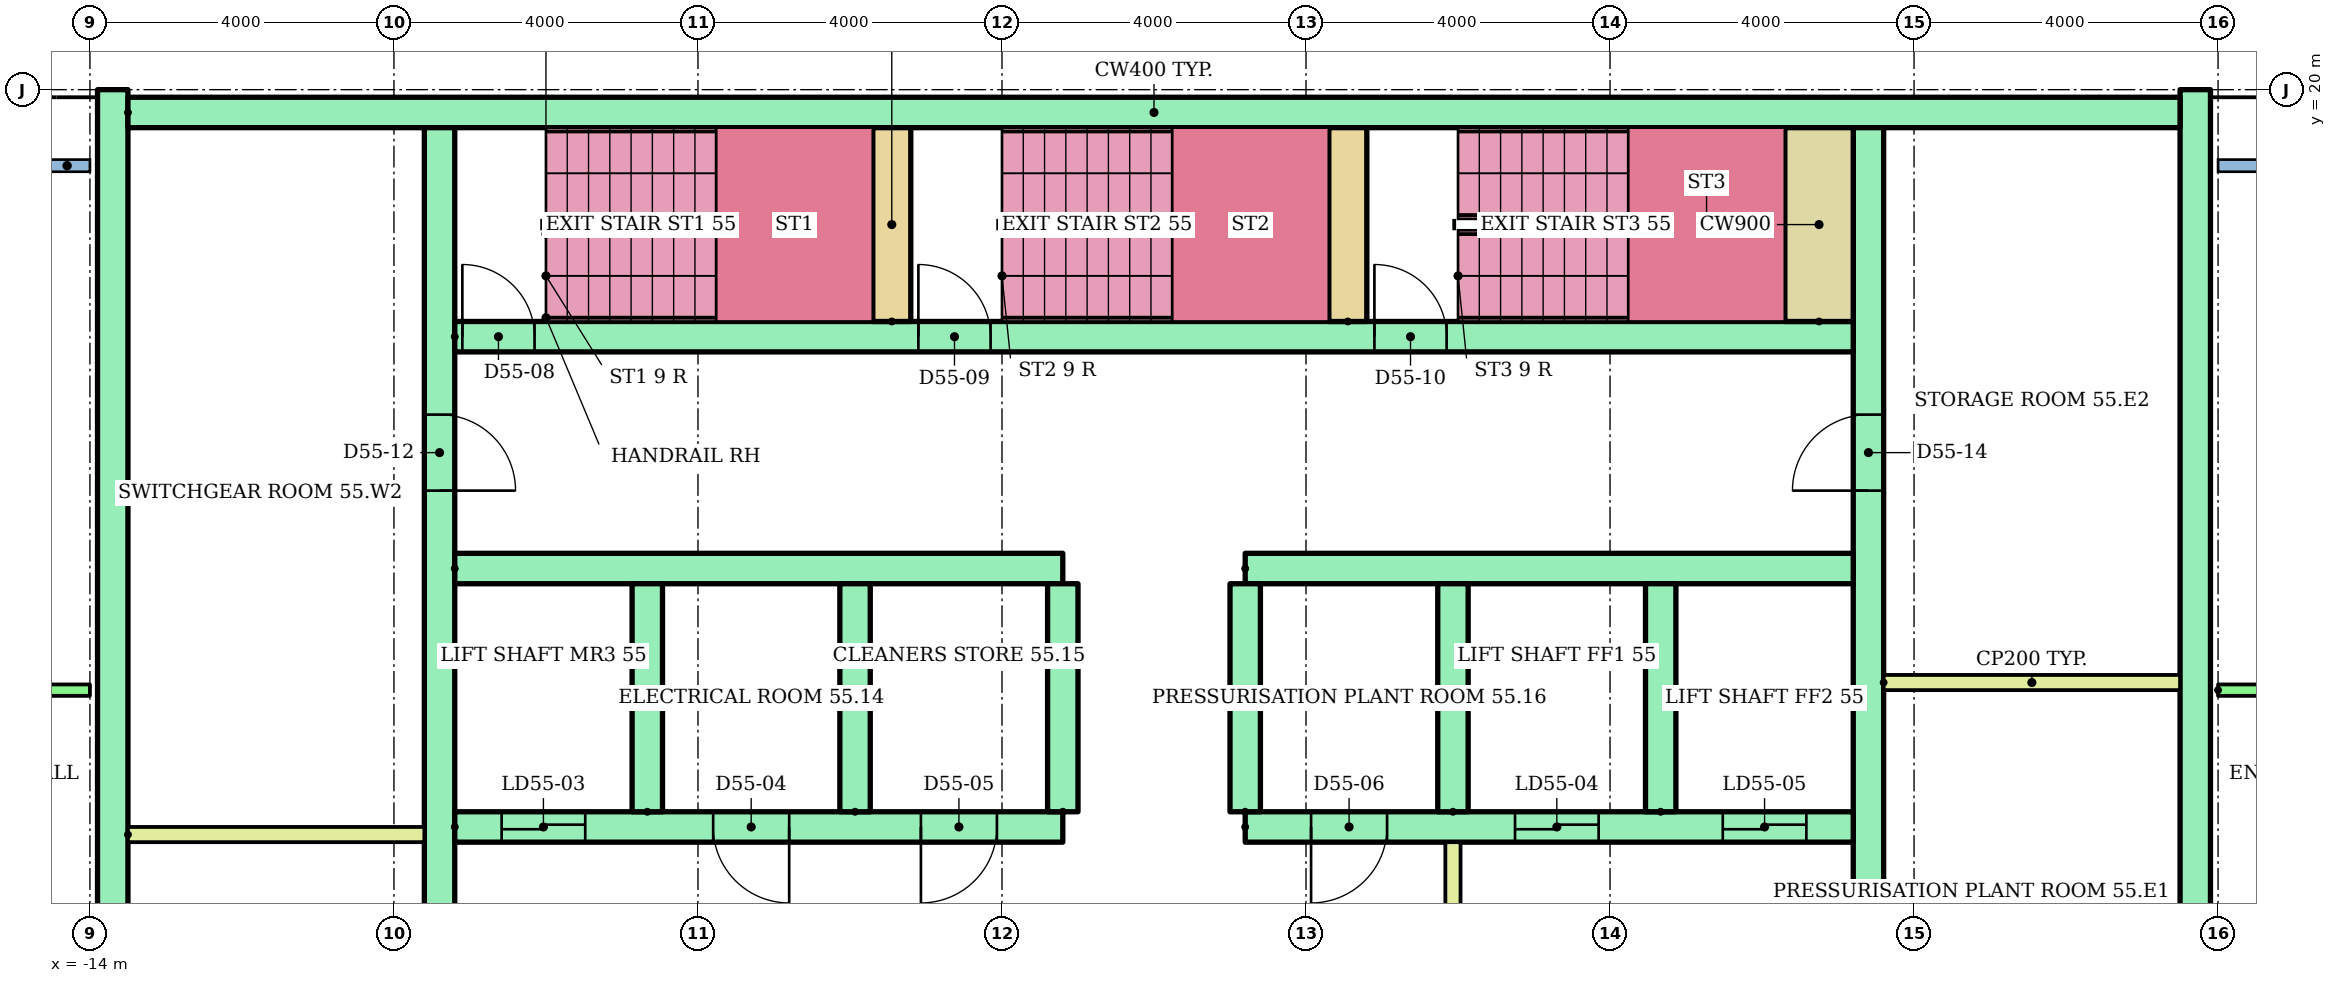
"""IFC4 building model, lengths in metres.
Left out: names, types, materials, properties, quantities, classifications, styles, units other than length and angle.
Written with IfcOpenShell. Run it as: python <this file> out.ifc"""

import sys

from ifc_helpers import new_model, si_unit, direction, frame, frame_2d, origin, place, context, subcontext, project, spatial, rectangle, extrude, element, fill, save


model = new_model("IFC4")
c1 = context("Model", 3, precision=1e-05, world=origin(), true_north=direction((0.0, 1.0)))
c2 = subcontext(c1, "Body", "Model", "MODEL_VIEW")
j1 = project(units=[si_unit("LENGTHUNIT", "METRE"), si_unit("PLANEANGLEUNIT", "RADIAN")], contexts=[c1])
p1 = place(None, origin())
s1 = spatial("IfcSite", under=j1, at=p1, CompositionType="ELEMENT")
p2 = place(p1, origin())
s2 = spatial("IfcBuilding", under=s1, at=p2, CompositionType="ELEMENT")
p3 = place(p2, frame((0.0, 0.0, 214.0)))
s3 = spatial("IfcBuildingStorey", under=s2, at=p3, CompositionType="ELEMENT", Elevation=214.0)
for number, where, z_axis, x_axis in (
    (1, (-13.7, 3.0, 0.0), (0.0, 0.0, 1.0), (0.0, 1.0, 0.0)),
    (2, (13.7, 3.0, 0.0), (0.0, 0.0, 1.0), (0.0, 1.0, 0.0)),
):
    element("IfcWall", number, at=place(p3, frame(where, z_axis=z_axis, x_axis=x_axis)), inside=s3, PredefinedType="SHEAR", context=c2, shape_type="SweptSolid", body=[
        extrude(rectangle(XDim=17.0, YDim=0.4, at=frame_2d((8.5, 0.0))), origin(), (0.0, 0.0, 1.0), 2.92),
    ])
p4 = place(p3, frame((-13.5, 19.7, 0.0)))
e3 = element("IfcWall", 3, at=p4, inside=s3, PredefinedType="SHEAR", context=c2, shape_type="SweptSolid", body=[
    extrude(rectangle(XDim=27.0, YDim=0.4, at=frame_2d((13.5, 0.0))), origin(), (0.0, 0.0, 1.0), 2.92),
])
p5 = place(p3, frame((-9.4, 6.8, 0.0), z_axis=(0.0, 0.0, 1.0), x_axis=(0.0, 1.0, 0.0)))
e4 = element("IfcWall", 4, at=p5, inside=s3, PredefinedType="SHEAR", context=c2, shape_type="SweptSolid", body=[
    extrude(rectangle(XDim=12.7, YDim=0.4, at=frame_2d((6.35, 0.0))), origin(), (0.0, 0.0, 1.0), 2.92),
])
p6 = place(p5, frame((1.15, 0.0, 0.0)))
e5 = element("IfcOpeningElement", 5, at=p6, cuts=e4, PredefinedType="OPENING", context=c2, shape_type="SweptSolid", body=[
    extrude(rectangle(XDim=1.0, YDim=2.1, at=frame_2d((0.5, 1.05))), frame((0.0, 0.21, 0.0), z_axis=(0.0, -1.0, 0.0), x_axis=(1.0, 0.0, 0.0)), (0.0, 0.0, 1.0), 0.42),
])
p7 = place(p5, frame((7.925, 0.0, 0.0)))
e6 = element("IfcOpeningElement", 6, at=p7, cuts=e4, PredefinedType="OPENING", context=c2, shape_type="SweptSolid", body=[
    extrude(rectangle(XDim=1.0, YDim=2.1, at=frame_2d((0.5, 1.05))), frame((0.0, 0.21, 0.0), z_axis=(0.0, -1.0, 0.0), x_axis=(1.0, 0.0, 0.0)), (0.0, 0.0, 1.0), 0.42),
])
p8 = place(p3, frame((9.4, 6.8, 0.0), z_axis=(0.0, 0.0, 1.0), x_axis=(0.0, 1.0, 0.0)))
e7 = element("IfcWall", 7, at=p8, inside=s3, PredefinedType="SHEAR", context=c2, shape_type="SweptSolid", body=[
    extrude(rectangle(XDim=12.7, YDim=0.4, at=frame_2d((6.35, 0.0))), origin(), (0.0, 0.0, 1.0), 2.92),
])
p9 = place(p8, frame((1.15, 0.0, 0.0)))
e8 = element("IfcOpeningElement", 8, at=p9, cuts=e7, PredefinedType="OPENING", context=c2, shape_type="SweptSolid", body=[
    extrude(rectangle(XDim=1.0, YDim=2.1, at=frame_2d((0.5, 1.05))), frame((0.0, 0.21, 0.0), z_axis=(0.0, -1.0, 0.0), x_axis=(1.0, 0.0, 0.0)), (0.0, 0.0, 1.0), 0.42),
])
p10 = place(p8, frame((7.925, 0.0, 0.0)))
e9 = element("IfcOpeningElement", 9, at=p10, cuts=e7, PredefinedType="OPENING", context=c2, shape_type="SweptSolid", body=[
    extrude(rectangle(XDim=1.0, YDim=2.1, at=frame_2d((0.5, 1.05))), frame((0.0, 0.21, 0.0), z_axis=(0.0, -1.0, 0.0), x_axis=(1.0, 0.0, 0.0)), (0.0, 0.0, 1.0), 0.42),
])
p11 = place(p3, frame((-9.2, 10.3, 0.0)))
e10 = element("IfcWall", 10, at=p11, inside=s3, PredefinedType="SHEAR", context=c2, shape_type="SweptSolid", body=[
    extrude(rectangle(XDim=8.0, YDim=0.4, at=frame_2d((4.0, 0.0))), origin(), (0.0, 0.0, 1.0), 2.92),
])
p12 = place(p11, frame((0.617, 0.0, 0.0)))
e11 = element("IfcOpeningElement", 11, at=p12, cuts=e10, PredefinedType="OPENING", context=c2, shape_type="SweptSolid", body=[
    extrude(rectangle(XDim=1.1, YDim=2.1, at=frame_2d((0.55, 1.05))), frame((0.0, 0.21, 0.0), z_axis=(0.0, -1.0, 0.0), x_axis=(1.0, 0.0, 0.0)), (0.0, 0.0, 1.0), 0.42),
])
p13 = place(p11, frame((3.4, 0.0, 0.0)))
e12 = element("IfcOpeningElement", 12, at=p13, cuts=e10, PredefinedType="OPENING", context=c2, shape_type="SweptSolid", body=[
    extrude(rectangle(XDim=1.0, YDim=2.1, at=frame_2d((0.5, 1.05))), frame((0.0, 0.21, 0.0), z_axis=(0.0, -1.0, 0.0), x_axis=(1.0, 0.0, 0.0)), (0.0, 0.0, 1.0), 0.42),
])
p14 = place(p11, frame((6.133, 0.0, 0.0)))
e13 = element("IfcOpeningElement", 13, at=p14, cuts=e10, PredefinedType="OPENING", context=c2, shape_type="SweptSolid", body=[
    extrude(rectangle(XDim=1.0, YDim=2.1, at=frame_2d((0.5, 1.05))), frame((0.0, 0.21, 0.0), z_axis=(0.0, -1.0, 0.0), x_axis=(1.0, 0.0, 0.0)), (0.0, 0.0, 1.0), 0.42),
])
p15 = place(p3, frame((-9.2, 13.7, 0.0)))
e14 = element("IfcWall", 14, at=p15, inside=s3, PredefinedType="SHEAR", context=c2, shape_type="SweptSolid", body=[
    extrude(rectangle(XDim=8.0, YDim=0.4, at=frame_2d((4.0, 0.0))), origin(), (0.0, 0.0, 1.0), 2.92),
])
p16 = place(p3, frame((1.2, 10.3, 0.0)))
e15 = element("IfcWall", 15, at=p16, inside=s3, PredefinedType="SHEAR", context=c2, shape_type="SweptSolid", body=[
    extrude(rectangle(XDim=8.0, YDim=0.4, at=frame_2d((4.0, 0.0))), origin(), (0.0, 0.0, 1.0), 2.92),
])
p17 = place(p16, frame((3.55, 0.0, 0.0)))
e16 = element("IfcOpeningElement", 16, at=p17, cuts=e15, PredefinedType="OPENING", context=c2, shape_type="SweptSolid", body=[
    extrude(rectangle(XDim=1.1, YDim=2.1, at=frame_2d((0.55, 1.05))), frame((0.0, 0.21, 0.0), z_axis=(0.0, -1.0, 0.0), x_axis=(1.0, 0.0, 0.0)), (0.0, 0.0, 1.0), 0.42),
])
p18 = place(p16, frame((6.283, 0.0, 0.0)))
e17 = element("IfcOpeningElement", 17, at=p18, cuts=e15, PredefinedType="OPENING", context=c2, shape_type="SweptSolid", body=[
    extrude(rectangle(XDim=1.1, YDim=2.1, at=frame_2d((0.55, 1.05))), frame((0.0, 0.21, 0.0), z_axis=(0.0, -1.0, 0.0), x_axis=(1.0, 0.0, 0.0)), (0.0, 0.0, 1.0), 0.42),
])
p19 = place(p16, frame((0.867, 0.0, 0.0)))
e18 = element("IfcOpeningElement", 18, at=p19, cuts=e15, PredefinedType="OPENING", context=c2, shape_type="SweptSolid", body=[
    extrude(rectangle(XDim=1.0, YDim=2.1, at=frame_2d((0.5, 1.05))), frame((0.0, 0.21, 0.0), z_axis=(0.0, -1.0, 0.0), x_axis=(1.0, 0.0, 0.0)), (0.0, 0.0, 1.0), 0.42),
])
p20 = place(p3, frame((1.2, 13.7, 0.0)))
e19 = element("IfcWall", 19, at=p20, inside=s3, PredefinedType="SHEAR", context=c2, shape_type="SweptSolid", body=[
    extrude(rectangle(XDim=8.0, YDim=0.4, at=frame_2d((4.0, 0.0))), origin(), (0.0, 0.0, 1.0), 2.92),
])
for number, where, z_axis, x_axis in (
    (20, (-6.667, 10.5, 0.0), (0.0, 0.0, 1.0), (0.0, 1.0, 0.0)),
    (21, (-3.933, 10.5, 0.0), (0.0, 0.0, 1.0), (0.0, 1.0, 0.0)),
    (22, (-1.2, 10.5, 0.0), (0.0, 0.0, 1.0), (0.0, 1.0, 0.0)),
    (23, (1.2, 10.5, 0.0), (0.0, 0.0, 1.0), (0.0, 1.0, 0.0)),
    (24, (3.933, 10.5, 0.0), (0.0, 0.0, 1.0), (0.0, 1.0, 0.0)),
    (25, (6.667, 10.5, 0.0), (0.0, 0.0, 1.0), (0.0, 1.0, 0.0)),
):
    element("IfcWall", number, at=place(p3, frame(where, z_axis=z_axis, x_axis=x_axis)), inside=s3, PredefinedType="SHEAR", context=c2, shape_type="SweptSolid", body=[
        extrude(rectangle(XDim=3.0, YDim=0.4, at=frame_2d((1.5, 0.0))), origin(), (0.0, 0.0, 1.0), 2.92),
    ])
p21 = place(p3, frame((3.933, 6.8, 0.0), z_axis=(0.0, 0.0, 1.0), x_axis=(0.0, 1.0, 0.0)))
e26 = element("IfcWall", 26, at=p21, inside=s3, PredefinedType="PARTITIONING", context=c2, shape_type="SweptSolid", body=[
    extrude(rectangle(XDim=3.3, YDim=0.2, at=frame_2d((1.65, 0.0))), origin(), (0.0, 0.0, 1.0), 2.92),
])
p22 = place(p21, frame((1.1, 0.0, 0.0)))
e27 = element("IfcOpeningElement", 27, at=p22, cuts=e26, PredefinedType="OPENING", context=c2, shape_type="SweptSolid", body=[
    extrude(rectangle(XDim=1.1, YDim=2.1, at=frame_2d((0.55, 1.05))), frame((0.0, 0.11, 0.0), z_axis=(0.0, -1.0, 0.0), x_axis=(1.0, 0.0, 0.0)), (0.0, 0.0, 1.0), 0.22),
])
p23 = place(p3, frame((-9.2, 16.75, 0.0)))
e28 = element("IfcWall", 28, at=p23, inside=s3, PredefinedType="SHEAR", context=c2, shape_type="SweptSolid", body=[
    extrude(rectangle(XDim=18.4, YDim=0.4, at=frame_2d((9.2, 0.0))), origin(), (0.0, 0.0, 1.0), 2.92),
])
p24 = place(p23, frame((0.1, 0.0, 0.0)))
e29 = element("IfcOpeningElement", 29, at=p24, cuts=e28, PredefinedType="OPENING", context=c2, shape_type="SweptSolid", body=[
    extrude(rectangle(XDim=0.95, YDim=2.1, at=frame_2d((0.475, 1.05))), frame((0.0, 0.21, 0.0), z_axis=(0.0, -1.0, 0.0), x_axis=(1.0, 0.0, 0.0)), (0.0, 0.0, 1.0), 0.42),
])
p25 = place(p23, frame((6.1, 0.0, 0.0)))
e30 = element("IfcOpeningElement", 30, at=p25, cuts=e28, PredefinedType="OPENING", context=c2, shape_type="SweptSolid", body=[
    extrude(rectangle(XDim=0.95, YDim=2.1, at=frame_2d((0.475, 1.05))), frame((0.0, 0.21, 0.0), z_axis=(0.0, -1.0, 0.0), x_axis=(1.0, 0.0, 0.0)), (0.0, 0.0, 1.0), 0.42),
])
p26 = place(p23, frame((12.1, 0.0, 0.0)))
e31 = element("IfcOpeningElement", 31, at=p26, cuts=e28, PredefinedType="OPENING", context=c2, shape_type="SweptSolid", body=[
    extrude(rectangle(XDim=0.95, YDim=2.1, at=frame_2d((0.475, 1.05))), frame((0.0, 0.21, 0.0), z_axis=(0.0, -1.0, 0.0), x_axis=(1.0, 0.0, 0.0)), (0.0, 0.0, 1.0), 0.42),
])
for number, where, z_axis, x_axis in (
    (32, (-3.45, 16.95, 0.0), (0.0, 0.0, 1.0), (0.0, 1.0, 0.0)),
    (33, (2.55, 16.95, 0.0), (0.0, 0.0, 1.0), (0.0, 1.0, 0.0)),
):
    element("IfcWall", number, at=place(p3, frame(where, z_axis=z_axis, x_axis=x_axis)), inside=s3, PredefinedType="SHEAR", context=c2, shape_type="SweptSolid", body=[
        extrude(rectangle(XDim=2.55, YDim=0.5, at=frame_2d((1.275, 0.0))), origin(), (0.0, 0.0, 1.0), 2.92),
    ])
p27 = place(p3, frame((8.75, 16.95, 0.0), z_axis=(0.0, 0.0, 1.0), x_axis=(0.0, 1.0, 0.0)))
e34 = element("IfcWall", 34, at=p27, inside=s3, PredefinedType="SHEAR", context=c2, shape_type="SweptSolid", body=[
    extrude(rectangle(XDim=2.55, YDim=0.9, at=frame_2d((1.275, 0.0))), origin(), (0.0, 0.0, 1.0), 2.92),
])
for number, where in (
    (35, (-13.5, 10.2, 0.0)),
    (36, (9.6, 12.2, 0.0)),
):
    element("IfcWall", number, at=place(p3, frame(where)), inside=s3, PredefinedType="PARTITIONING", context=c2, shape_type="SweptSolid", body=[
        extrude(rectangle(XDim=3.9, YDim=0.2, at=frame_2d((1.95, 0.0))), origin(), (0.0, 0.0, 1.0), 2.92),
    ])
p28 = place(p3, frame((-28.92, 12.1, 0.0)))
e37 = element("IfcWall", 37, at=p28, inside=s3, PredefinedType="PARTITIONING", context=c2, shape_type="SweptSolid", body=[
    extrude(rectangle(XDim=14.92, YDim=0.15, at=frame_2d((7.46, 0.0))), origin(), (0.0, 0.0, 1.0), 2.4),
])
p29 = place(p28, frame((1.97, 0.0, 0.0)))
e38 = element("IfcOpeningElement", 38, at=p29, cuts=e37, PredefinedType="OPENING", context=c2, shape_type="SweptSolid", body=[
    extrude(rectangle(XDim=1.0, YDim=2.1, at=frame_2d((0.5, 1.05))), frame((0.0, 0.085, 0.0), z_axis=(0.0, -1.0, 0.0), x_axis=(1.0, 0.0, 0.0)), (0.0, 0.0, 1.0), 0.17),
])
p30 = place(p28, frame((9.32, 0.0, 0.0)))
e39 = element("IfcOpeningElement", 39, at=p30, cuts=e37, PredefinedType="OPENING", context=c2, shape_type="SweptSolid", body=[
    extrude(rectangle(XDim=1.0, YDim=2.1, at=frame_2d((0.5, 1.05))), frame((0.0, 0.085, 0.0), z_axis=(0.0, -1.0, 0.0), x_axis=(1.0, 0.0, 0.0)), (0.0, 0.0, 1.0), 0.17),
])
p31 = place(p3, frame((14.0, 12.1, 0.0)))
e40 = element("IfcWall", 40, at=p31, inside=s3, PredefinedType="PARTITIONING", context=c2, shape_type="SweptSolid", body=[
    extrude(rectangle(XDim=14.92, YDim=0.15, at=frame_2d((7.46, 0.0))), origin(), (0.0, 0.0, 1.0), 2.4),
])
p32 = place(p31, frame((1.55, 0.0, 0.0)))
e41 = element("IfcOpeningElement", 41, at=p32, cuts=e40, PredefinedType="OPENING", context=c2, shape_type="SweptSolid", body=[
    extrude(rectangle(XDim=0.9, YDim=2.1, at=frame_2d((0.45, 1.05))), frame((0.0, 0.085, 0.0), z_axis=(0.0, -1.0, 0.0), x_axis=(1.0, 0.0, 0.0)), (0.0, 0.0, 1.0), 0.17),
])
p33 = place(p31, frame((6.65, 0.0, 0.0)))
e42 = element("IfcOpeningElement", 42, at=p33, cuts=e40, PredefinedType="OPENING", context=c2, shape_type="SweptSolid", body=[
    extrude(rectangle(XDim=0.9, YDim=2.1, at=frame_2d((0.45, 1.05))), frame((0.0, 0.085, 0.0), z_axis=(0.0, -1.0, 0.0), x_axis=(1.0, 0.0, 0.0)), (0.0, 0.0, 1.0), 0.17),
])
p34 = place(p31, frame((12.476, 0.0, 0.0)))
e43 = element("IfcOpeningElement", 43, at=p34, cuts=e40, PredefinedType="OPENING", context=c2, shape_type="SweptSolid", body=[
    extrude(rectangle(XDim=1.0, YDim=2.1, at=frame_2d((0.5, 1.05))), frame((0.0, 0.085, 0.0), z_axis=(0.0, -1.0, 0.0), x_axis=(1.0, 0.0, 0.0)), (0.0, 0.0, 1.0), 0.17),
])
p35 = place(p12, origin())
e44 = element("IfcDoor", 44, at=p35, inside=s3, OperationType="SLIDING_TO_LEFT", PredefinedType="DOOR", context=c2, shape_type="SweptSolid", body=[
    extrude(rectangle(XDim=1.1, YDim=2.1, at=frame_2d((0.55, 1.05))), frame((0.0, 0.025, 0.0), z_axis=(0.0, -1.0, 0.0), x_axis=(1.0, 0.0, 0.0)), (0.0, 0.0, 1.0), 0.05),
])
fill(e11, e44)
p36 = place(p17, origin())
e45 = element("IfcDoor", 45, at=p36, inside=s3, OperationType="SLIDING_TO_LEFT", PredefinedType="DOOR", context=c2, shape_type="SweptSolid", body=[
    extrude(rectangle(XDim=1.1, YDim=2.1, at=frame_2d((0.55, 1.05))), frame((0.0, 0.025, 0.0), z_axis=(0.0, -1.0, 0.0), x_axis=(1.0, 0.0, 0.0)), (0.0, 0.0, 1.0), 0.05),
])
fill(e16, e45)
p37 = place(p18, origin())
e46 = element("IfcDoor", 46, at=p37, inside=s3, OperationType="SLIDING_TO_LEFT", PredefinedType="DOOR", context=c2, shape_type="SweptSolid", body=[
    extrude(rectangle(XDim=1.1, YDim=2.1, at=frame_2d((0.55, 1.05))), frame((0.0, 0.025, 0.0), z_axis=(0.0, -1.0, 0.0), x_axis=(1.0, 0.0, 0.0)), (0.0, 0.0, 1.0), 0.05),
])
fill(e17, e46)
p38 = place(p13, frame((1.0, 0.0, 0.0), z_axis=(0.0, 0.0, 1.0), x_axis=(-1.0, 0.0, 0.0)))
e47 = element("IfcDoor", 47, at=p38, inside=s3, OperationType="SINGLE_SWING_RIGHT", PredefinedType="DOOR", context=c2, shape_type="SweptSolid", body=[
    extrude(rectangle(XDim=1.0, YDim=2.1, at=frame_2d((0.5, 1.05))), frame((0.0, 0.025, 0.0), z_axis=(0.0, -1.0, 0.0), x_axis=(1.0, 0.0, 0.0)), (0.0, 0.0, 1.0), 0.05),
])
fill(e12, e47)
p39 = place(p14, frame((1.0, 0.0, 0.0), z_axis=(0.0, 0.0, 1.0), x_axis=(-1.0, 0.0, 0.0)))
e48 = element("IfcDoor", 48, at=p39, inside=s3, OperationType="SINGLE_SWING_LEFT", PredefinedType="DOOR", context=c2, shape_type="SweptSolid", body=[
    extrude(rectangle(XDim=1.0, YDim=2.1, at=frame_2d((0.5, 1.05))), frame((0.0, 0.025, 0.0), z_axis=(0.0, -1.0, 0.0), x_axis=(1.0, 0.0, 0.0)), (0.0, 0.0, 1.0), 0.05),
])
fill(e13, e48)
p40 = place(p19, frame((1.0, 0.0, 0.0), z_axis=(0.0, 0.0, 1.0), x_axis=(-1.0, 0.0, 0.0)))
e49 = element("IfcDoor", 49, at=p40, inside=s3, OperationType="SINGLE_SWING_LEFT", PredefinedType="DOOR", context=c2, shape_type="SweptSolid", body=[
    extrude(rectangle(XDim=1.0, YDim=2.1, at=frame_2d((0.5, 1.05))), frame((0.0, 0.025, 0.0), z_axis=(0.0, -1.0, 0.0), x_axis=(1.0, 0.0, 0.0)), (0.0, 0.0, 1.0), 0.05),
])
fill(e18, e49)
p41 = place(p24, origin())
e50 = element("IfcDoor", 50, at=p41, inside=s3, OperationType="SINGLE_SWING_LEFT", PredefinedType="DOOR", context=c2, shape_type="SweptSolid", body=[
    extrude(rectangle(XDim=0.95, YDim=2.1, at=frame_2d((0.475, 1.05))), frame((0.0, 0.025, 0.0), z_axis=(0.0, -1.0, 0.0), x_axis=(1.0, 0.0, 0.0)), (0.0, 0.0, 1.0), 0.05),
])
fill(e29, e50)
p42 = place(p25, origin())
e51 = element("IfcDoor", 51, at=p42, inside=s3, OperationType="SINGLE_SWING_LEFT", PredefinedType="DOOR", context=c2, shape_type="SweptSolid", body=[
    extrude(rectangle(XDim=0.95, YDim=2.1, at=frame_2d((0.475, 1.05))), frame((0.0, 0.025, 0.0), z_axis=(0.0, -1.0, 0.0), x_axis=(1.0, 0.0, 0.0)), (0.0, 0.0, 1.0), 0.05),
])
fill(e30, e51)
p43 = place(p26, origin())
e52 = element("IfcDoor", 52, at=p43, inside=s3, OperationType="SINGLE_SWING_LEFT", PredefinedType="DOOR", context=c2, shape_type="SweptSolid", body=[
    extrude(rectangle(XDim=0.95, YDim=2.1, at=frame_2d((0.475, 1.05))), frame((0.0, 0.025, 0.0), z_axis=(0.0, -1.0, 0.0), x_axis=(1.0, 0.0, 0.0)), (0.0, 0.0, 1.0), 0.05),
])
fill(e31, e52)
p44 = place(p7, frame((1.0, 0.0, 0.0), z_axis=(0.0, 0.0, 1.0), x_axis=(-1.0, 0.0, 0.0)))
e53 = element("IfcDoor", 53, at=p44, inside=s3, OperationType="SINGLE_SWING_LEFT", PredefinedType="DOOR", context=c2, shape_type="SweptSolid", body=[
    extrude(rectangle(XDim=1.0, YDim=2.1, at=frame_2d((0.5, 1.05))), frame((0.0, 0.025, 0.0), z_axis=(0.0, -1.0, 0.0), x_axis=(1.0, 0.0, 0.0)), (0.0, 0.0, 1.0), 0.05),
])
fill(e6, e53)
p45 = place(p10, origin())
e54 = element("IfcDoor", 54, at=p45, inside=s3, OperationType="SINGLE_SWING_LEFT", PredefinedType="DOOR", context=c2, shape_type="SweptSolid", body=[
    extrude(rectangle(XDim=1.0, YDim=2.1, at=frame_2d((0.5, 1.05))), frame((0.0, 0.025, 0.0), z_axis=(0.0, -1.0, 0.0), x_axis=(1.0, 0.0, 0.0)), (0.0, 0.0, 1.0), 0.05),
])
fill(e9, e54)
save(model, sys.argv[1])
